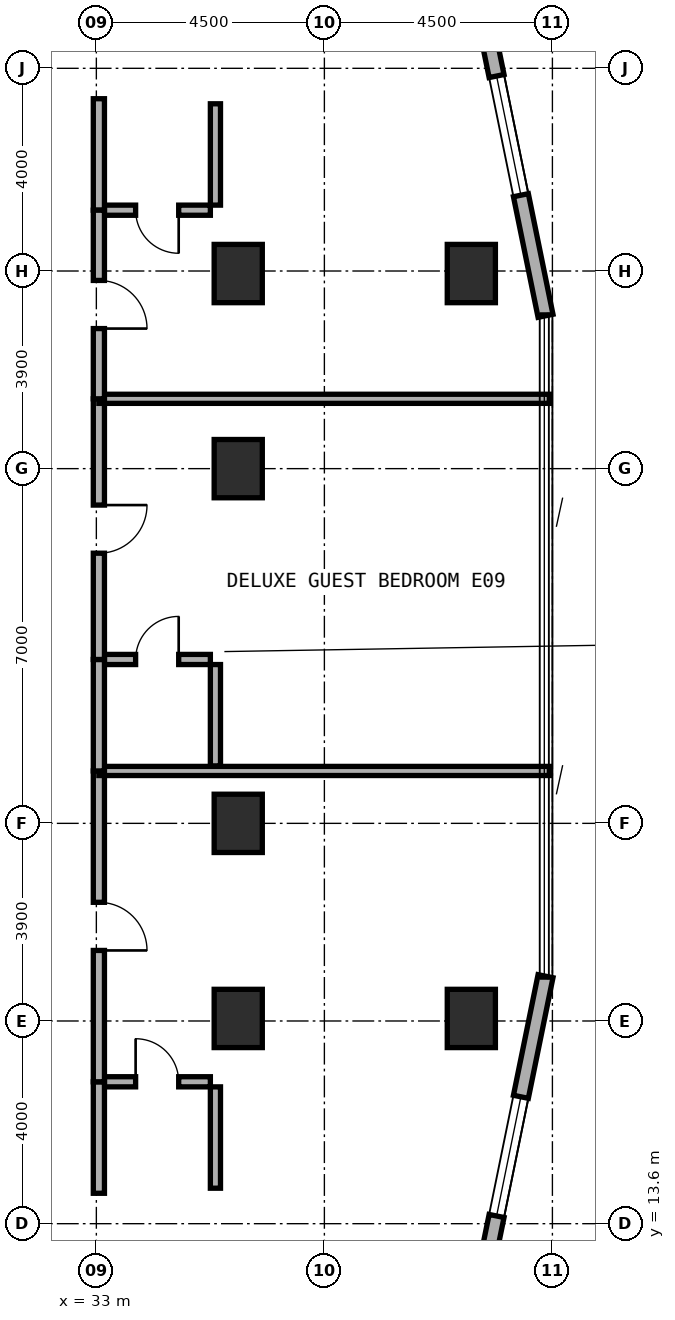
"""IFC4 building model, lengths in metres.
Left out: names, types, materials, properties, quantities, classifications, styles, units other than length and angle.
Written with IfcOpenShell. Run it as: python <this file> out.ifc"""

import sys

from ifc_helpers import new_model, si_unit, direction, frame, frame_2d, origin, origin_2d, place, context, subcontext, project, spatial, rectangle, extrude, element, fill, save


model = new_model("IFC4")
c1 = context("Model", 3, precision=1e-05, world=origin(), true_north=direction((0.0, 1.0)))
c2 = subcontext(c1, "Body", "Model", "MODEL_VIEW")
j1 = project(units=[si_unit("LENGTHUNIT", "METRE"), si_unit("PLANEANGLEUNIT", "RADIAN")], contexts=[c1])
p1 = place(None, origin())
s1 = spatial("IfcSite", under=j1, at=p1, CompositionType="ELEMENT")
p2 = place(p1, origin())
s2 = spatial("IfcBuilding", under=s1, at=p2, CompositionType="ELEMENT")
p3 = place(p2, frame((0.0, 0.0, 59.0)))
s3 = spatial("IfcBuildingStorey", under=s2, at=p3, CompositionType="ELEMENT", Elevation=59.0)
for number, where, z_axis, x_axis in (
    (1, (35.8, 21.5, 0.0), (0.0, 0.0, 1.0), (1.0, 0.0, 0.0)),
    (2, (35.8, 28.5, 0.0), (0.0, 0.0, 1.0), (1.0, 0.0, 0.0)),
    (3, (35.8, 17.65, 0.0), (0.0, 0.0, 1.0), (1.0, 0.0, 0.0)),
    (4, (35.8, 32.35, 0.0), (0.0, 0.0, 1.0), (1.0, 0.0, 0.0)),
    (5, (40.4, 17.65, 0.0), (0.0, 0.0, 1.0), (1.0, 0.0, 0.0)),
    (6, (40.4, 32.35, 0.0), (0.0, 0.0, 1.0), (1.0, 0.0, 0.0)),
):
    element("IfcColumn", number, at=place(p3, frame(where, z_axis=z_axis, x_axis=x_axis)), inside=s3, PredefinedType="COLUMN", context=c2, shape_type="SweptSolid", body=[
        extrude(rectangle(XDim=0.95, YDim=1.15, at=origin_2d()), origin(), (0.0, 0.0, 1.0), 3.5),
    ])
p4 = place(p3, frame((39.851, 8.622, 0.0), z_axis=(0.0, 0.0, 1.0), x_axis=(0.199990901713, 0.979797754249, 0.0)))
e7 = element("IfcWall", 7, at=p4, inside=s3, PredefinedType="STANDARD", context=c2, shape_type="SweptSolid", body=[
    extrude(rectangle(XDim=10.065, YDim=0.3, at=frame_2d((5.033, 0.0))), origin(), (0.0, 0.0, 1.0), 3.22),
])
p5 = place(p4, frame((0.378, 0.0, 0.85)))
e8 = element("IfcOpeningElement", 8, at=p5, cuts=e7, PredefinedType="OPENING", context=c2, shape_type="SweptSolid", body=[
    extrude(rectangle(XDim=1.8, YDim=1.5, at=frame_2d((0.9, 0.75))), frame((0.0, 0.16, 0.0), z_axis=(0.0, -1.0, 0.0), x_axis=(1.0, 0.0, 0.0)), (0.0, 0.0, 1.0), 0.32),
])
p6 = place(p4, frame((5.236, 0.0, 0.8)))
e9 = element("IfcOpeningElement", 9, at=p6, cuts=e7, PredefinedType="OPENING", context=c2, shape_type="SweptSolid", body=[
    extrude(rectangle(XDim=2.4, YDim=1.6, at=frame_2d((1.2, 0.8))), frame((0.0, 0.16, 0.0), z_axis=(0.0, -1.0, 0.0), x_axis=(1.0, 0.0, 0.0)), (0.0, 0.0, 1.0), 0.32),
])
p7 = place(p3, frame((41.864, 31.516, 0.0), z_axis=(0.0, 0.0, 1.0), x_axis=(-0.199990901713, 0.979797754249, 0.0)))
e10 = element("IfcWall", 10, at=p7, inside=s3, PredefinedType="STANDARD", context=c2, shape_type="SweptSolid", body=[
    extrude(rectangle(XDim=10.065, YDim=0.3, at=frame_2d((5.033, 0.0))), origin(), (0.0, 0.0, 1.0), 3.22),
])
p8 = place(p7, frame((2.429, 0.0, 0.8)))
e11 = element("IfcOpeningElement", 11, at=p8, cuts=e10, PredefinedType="OPENING", context=c2, shape_type="SweptSolid", body=[
    extrude(rectangle(XDim=2.4, YDim=1.6, at=frame_2d((1.2, 0.8))), frame((0.0, 0.16, 0.0), z_axis=(0.0, -1.0, 0.0), x_axis=(1.0, 0.0, 0.0)), (0.0, 0.0, 1.0), 0.32),
])
p9 = place(p7, frame((7.887, 0.0, 0.85)))
e12 = element("IfcOpeningElement", 12, at=p9, cuts=e10, PredefinedType="OPENING", context=c2, shape_type="SweptSolid", body=[
    extrude(rectangle(XDim=1.8, YDim=1.5, at=frame_2d((0.9, 0.75))), frame((0.0, 0.16, 0.0), z_axis=(0.0, -1.0, 0.0), x_axis=(1.0, 0.0, 0.0)), (0.0, 0.0, 1.0), 0.32),
])
p10 = place(p3, frame((33.15, 16.4, 0.0), z_axis=(0.0, 0.0, 1.0), x_axis=(1.0, 0.0, 0.0)))
e13 = element("IfcWall", 13, at=p10, inside=s3, PredefinedType="PLUMBINGWALL", context=c2, shape_type="SweptSolid", body=[
    extrude(rectangle(XDim=2.1, YDim=0.2, at=frame_2d((1.05, 0.0))), origin(), (0.0, 0.0, 1.0), 3.22),
])
p11 = place(p10, frame((0.625, 0.0, 0.0)))
e14 = element("IfcOpeningElement", 14, at=p11, cuts=e13, PredefinedType="OPENING", context=c2, shape_type="SweptSolid", body=[
    extrude(rectangle(XDim=0.85, YDim=2.1, at=frame_2d((0.425, 1.05))), frame((0.0, 0.11, 0.0), z_axis=(0.0, -1.0, 0.0), x_axis=(1.0, 0.0, 0.0)), (0.0, 0.0, 1.0), 0.22),
])
p12 = place(p3, frame((35.35, 14.3, 0.0), z_axis=(0.0, 0.0, 1.0), x_axis=(0.0, 1.0, 0.0)))
e15 = element("IfcWall", 15, at=p12, inside=s3, PredefinedType="PLUMBINGWALL", context=c2, shape_type="SweptSolid", body=[
    extrude(rectangle(XDim=2.0, YDim=0.2, at=frame_2d((1.0, 0.0))), origin(), (0.0, 0.0, 1.0), 2.745),
])
p13 = place(p3, frame((33.05, 14.2, 0.0), z_axis=(0.0, 0.0, 1.0), x_axis=(0.0, 1.0, 0.0)))
e16 = element("IfcWall", 16, at=p13, inside=s3, PredefinedType="SOLIDWALL", context=c2, shape_type="SweptSolid", body=[
    extrude(rectangle(XDim=2.2, YDim=0.22, at=frame_2d((1.1, 0.0))), origin(), (0.0, 0.0, 1.0), 3.22),
])
p14 = place(p3, frame((33.05, 16.4, 0.0), z_axis=(0.0, 0.0, 1.0), x_axis=(0.0, 1.0, 0.0)))
e17 = element("IfcWall", 17, at=p14, inside=s3, PredefinedType="SOLIDWALL", context=c2, shape_type="SweptSolid", body=[
    extrude(rectangle(XDim=6.134, YDim=0.22, at=frame_2d((3.067, 0.0))), origin(), (0.0, 0.0, 1.0), 2.495),
])
p15 = place(p14, frame((2.592, 0.0, 0.0)))
e18 = element("IfcOpeningElement", 18, at=p15, cuts=e17, PredefinedType="OPENING", context=c2, shape_type="SweptSolid", body=[
    extrude(rectangle(XDim=0.95, YDim=2.1, at=frame_2d((0.475, 1.05))), frame((0.0, 0.12, 0.0), z_axis=(0.0, -1.0, 0.0), x_axis=(1.0, 0.0, 0.0)), (0.0, 0.0, 1.0), 0.24),
])
p16 = place(p3, frame((33.05, 22.534, 0.0), z_axis=(0.0, 0.0, 1.0), x_axis=(1.0, 0.0, 0.0)))
e19 = element("IfcWall", 19, at=p16, inside=s3, PredefinedType="SOLIDWALL", context=c2, shape_type="SweptSolid", body=[
    extrude(rectangle(XDim=8.89, YDim=0.18, at=frame_2d((4.445, 0.0))), origin(), (0.0, 0.0, 1.0), 2.745),
])
p17 = place(p3, frame((33.15, 24.734, 0.0), z_axis=(0.0, 0.0, 1.0), x_axis=(1.0, 0.0, 0.0)))
e20 = element("IfcWall", 20, at=p17, inside=s3, PredefinedType="PLUMBINGWALL", context=c2, shape_type="SweptSolid", body=[
    extrude(rectangle(XDim=2.1, YDim=0.2, at=frame_2d((1.05, 0.0))), origin(), (0.0, 0.0, 1.0), 3.22),
])
p18 = place(p17, frame((0.625, 0.0, 0.0)))
e21 = element("IfcOpeningElement", 21, at=p18, cuts=e20, PredefinedType="OPENING", context=c2, shape_type="SweptSolid", body=[
    extrude(rectangle(XDim=0.85, YDim=2.1, at=frame_2d((0.425, 1.05))), frame((0.0, 0.11, 0.0), z_axis=(0.0, -1.0, 0.0), x_axis=(1.0, 0.0, 0.0)), (0.0, 0.0, 1.0), 0.22),
])
p19 = place(p3, frame((35.35, 22.634, 0.0), z_axis=(0.0, 0.0, 1.0), x_axis=(0.0, 1.0, 0.0)))
e22 = element("IfcWall", 22, at=p19, inside=s3, PredefinedType="PLUMBINGWALL", context=c2, shape_type="SweptSolid", body=[
    extrude(rectangle(XDim=2.0, YDim=0.2, at=frame_2d((1.0, 0.0))), origin(), (0.0, 0.0, 1.0), 3.22),
])
p20 = place(p3, frame((33.05, 22.534, 0.0), z_axis=(0.0, 0.0, 1.0), x_axis=(0.0, 1.0, 0.0)))
e23 = element("IfcWall", 23, at=p20, inside=s3, PredefinedType="SOLIDWALL", context=c2, shape_type="SweptSolid", body=[
    extrude(rectangle(XDim=2.2, YDim=0.22, at=frame_2d((1.1, 0.0))), origin(), (0.0, 0.0, 1.0), 3.22),
])
p21 = place(p3, frame((33.05, 24.734, 0.0), z_axis=(0.0, 0.0, 1.0), x_axis=(0.0, 1.0, 0.0)))
e24 = element("IfcWall", 24, at=p21, inside=s3, PredefinedType="SOLIDWALL", context=c2, shape_type="SweptSolid", body=[
    extrude(rectangle(XDim=5.144, YDim=0.22, at=frame_2d((2.572, 0.0))), origin(), (0.0, 0.0, 1.0), 2.495),
])
p22 = place(p21, frame((2.097, 0.0, 0.0)))
e25 = element("IfcOpeningElement", 25, at=p22, cuts=e24, PredefinedType="OPENING", context=c2, shape_type="SweptSolid", body=[
    extrude(rectangle(XDim=0.95, YDim=2.1, at=frame_2d((0.475, 1.05))), frame((0.0, 0.12, 0.0), z_axis=(0.0, -1.0, 0.0), x_axis=(1.0, 0.0, 0.0)), (0.0, 0.0, 1.0), 0.24),
])
p23 = place(p3, frame((33.05, 29.878, 0.0), z_axis=(0.0, 0.0, 1.0), x_axis=(1.0, 0.0, 0.0)))
e26 = element("IfcWall", 26, at=p23, inside=s3, PredefinedType="SOLIDWALL", context=c2, shape_type="SweptSolid", body=[
    extrude(rectangle(XDim=8.89, YDim=0.18, at=frame_2d((4.445, 0.0))), origin(), (0.0, 0.0, 1.0), 2.745),
])
p24 = place(p3, frame((33.15, 33.6, 0.0), z_axis=(0.0, 0.0, 1.0), x_axis=(1.0, 0.0, 0.0)))
e27 = element("IfcWall", 27, at=p24, inside=s3, PredefinedType="PLUMBINGWALL", context=c2, shape_type="SweptSolid", body=[
    extrude(rectangle(XDim=2.1, YDim=0.2, at=frame_2d((1.05, 0.0))), origin(), (0.0, 0.0, 1.0), 3.22),
])
p25 = place(p24, frame((0.625, 0.0, 0.0)))
e28 = element("IfcOpeningElement", 28, at=p25, cuts=e27, PredefinedType="OPENING", context=c2, shape_type="SweptSolid", body=[
    extrude(rectangle(XDim=0.85, YDim=2.1, at=frame_2d((0.425, 1.05))), frame((0.0, 0.11, 0.0), z_axis=(0.0, -1.0, 0.0), x_axis=(1.0, 0.0, 0.0)), (0.0, 0.0, 1.0), 0.22),
])
p26 = place(p3, frame((35.35, 33.7, 0.0), z_axis=(0.0, 0.0, 1.0), x_axis=(0.0, 1.0, 0.0)))
e29 = element("IfcWall", 29, at=p26, inside=s3, PredefinedType="PLUMBINGWALL", context=c2, shape_type="SweptSolid", body=[
    extrude(rectangle(XDim=2.0, YDim=0.2, at=frame_2d((1.0, 0.0))), origin(), (0.0, 0.0, 1.0), 2.745),
])
p27 = place(p3, frame((33.05, 33.6, 0.0), z_axis=(0.0, 0.0, 1.0), x_axis=(0.0, 1.0, 0.0)))
e30 = element("IfcWall", 30, at=p27, inside=s3, PredefinedType="SOLIDWALL", context=c2, shape_type="SweptSolid", body=[
    extrude(rectangle(XDim=2.2, YDim=0.22, at=frame_2d((1.1, 0.0))), origin(), (0.0, 0.0, 1.0), 3.22),
])
p28 = place(p3, frame((33.05, 29.878, 0.0), z_axis=(0.0, 0.0, 1.0), x_axis=(0.0, 1.0, 0.0)))
e31 = element("IfcWall", 31, at=p28, inside=s3, PredefinedType="SOLIDWALL", context=c2, shape_type="SweptSolid", body=[
    extrude(rectangle(XDim=3.722, YDim=0.22, at=frame_2d((1.861, 0.0))), origin(), (0.0, 0.0, 1.0), 2.495),
])
p29 = place(p28, frame((1.386, 0.0, 0.0)))
e32 = element("IfcOpeningElement", 32, at=p29, cuts=e31, PredefinedType="OPENING", context=c2, shape_type="SweptSolid", body=[
    extrude(rectangle(XDim=0.95, YDim=2.1, at=frame_2d((0.475, 1.05))), frame((0.0, 0.12, 0.0), z_axis=(0.0, -1.0, 0.0), x_axis=(1.0, 0.0, 0.0)), (0.0, 0.0, 1.0), 0.24),
])
p30 = place(p6, origin())
e33 = element("IfcWindow", 33, at=p30, inside=s3, PartitioningType="SINGLE_PANEL", PredefinedType="WINDOW", context=c2, shape_type="SweptSolid", body=[
    extrude(rectangle(XDim=2.4, YDim=1.6, at=frame_2d((1.2, 0.8))), frame((0.0, 0.03, 0.0), z_axis=(0.0, -1.0, 0.0), x_axis=(1.0, 0.0, 0.0)), (0.0, 0.0, 1.0), 0.06),
])
fill(e9, e33)
p31 = place(p8, origin())
e34 = element("IfcWindow", 34, at=p31, inside=s3, PartitioningType="SINGLE_PANEL", PredefinedType="WINDOW", context=c2, shape_type="SweptSolid", body=[
    extrude(rectangle(XDim=2.4, YDim=1.6, at=frame_2d((1.2, 0.8))), frame((0.0, 0.03, 0.0), z_axis=(0.0, -1.0, 0.0), x_axis=(1.0, 0.0, 0.0)), (0.0, 0.0, 1.0), 0.06),
])
fill(e11, e34)
p32 = place(p11, origin())
e35 = element("IfcDoor", 35, at=p32, inside=s3, OperationType="SINGLE_SWING_LEFT", PredefinedType="DOOR", context=c2, shape_type="SweptSolid", body=[
    extrude(rectangle(XDim=0.85, YDim=2.1, at=frame_2d((0.425, 1.05))), frame((0.0, 0.025, 0.0), z_axis=(0.0, -1.0, 0.0), x_axis=(1.0, 0.0, 0.0)), (0.0, 0.0, 1.0), 0.05),
])
fill(e14, e35)
p33 = place(p15, frame((0.95, 0.0, 0.0), z_axis=(0.0, 0.0, 1.0), x_axis=(-1.0, 0.0, 0.0)))
e36 = element("IfcDoor", 36, at=p33, inside=s3, OperationType="SINGLE_SWING_RIGHT", PredefinedType="DOOR", context=c2, shape_type="SweptSolid", body=[
    extrude(rectangle(XDim=0.95, YDim=2.1, at=frame_2d((0.475, 1.05))), frame((0.0, 0.025, 0.0), z_axis=(0.0, -1.0, 0.0), x_axis=(1.0, 0.0, 0.0)), (0.0, 0.0, 1.0), 0.05),
])
fill(e18, e36)
p34 = place(p18, origin())
e37 = element("IfcDoor", 37, at=p34, inside=s3, OperationType="SINGLE_SWING_RIGHT", PredefinedType="DOOR", context=c2, shape_type="SweptSolid", body=[
    extrude(rectangle(XDim=0.85, YDim=2.1, at=frame_2d((0.425, 1.05))), frame((0.0, 0.025, 0.0), z_axis=(0.0, -1.0, 0.0), x_axis=(1.0, 0.0, 0.0)), (0.0, 0.0, 1.0), 0.05),
])
fill(e21, e37)
p35 = place(p22, frame((0.95, 0.0, 0.0), z_axis=(0.0, 0.0, 1.0), x_axis=(-1.0, 0.0, 0.0)))
e38 = element("IfcDoor", 38, at=p35, inside=s3, OperationType="SINGLE_SWING_LEFT", PredefinedType="DOOR", context=c2, shape_type="SweptSolid", body=[
    extrude(rectangle(XDim=0.95, YDim=2.1, at=frame_2d((0.475, 1.05))), frame((0.0, 0.025, 0.0), z_axis=(0.0, -1.0, 0.0), x_axis=(1.0, 0.0, 0.0)), (0.0, 0.0, 1.0), 0.05),
])
fill(e25, e38)
p36 = place(p25, frame((0.85, 0.0, 0.0), z_axis=(0.0, 0.0, 1.0), x_axis=(-1.0, 0.0, 0.0)))
e39 = element("IfcDoor", 39, at=p36, inside=s3, OperationType="SINGLE_SWING_LEFT", PredefinedType="DOOR", context=c2, shape_type="SweptSolid", body=[
    extrude(rectangle(XDim=0.85, YDim=2.1, at=frame_2d((0.425, 1.05))), frame((0.0, 0.025, 0.0), z_axis=(0.0, -1.0, 0.0), x_axis=(1.0, 0.0, 0.0)), (0.0, 0.0, 1.0), 0.05),
])
fill(e28, e39)
p37 = place(p29, frame((0.95, 0.0, 0.0), z_axis=(0.0, 0.0, 1.0), x_axis=(-1.0, 0.0, 0.0)))
e40 = element("IfcDoor", 40, at=p37, inside=s3, OperationType="SINGLE_SWING_RIGHT", PredefinedType="DOOR", context=c2, shape_type="SweptSolid", body=[
    extrude(rectangle(XDim=0.95, YDim=2.1, at=frame_2d((0.475, 1.05))), frame((0.0, 0.025, 0.0), z_axis=(0.0, -1.0, 0.0), x_axis=(1.0, 0.0, 0.0)), (0.0, 0.0, 1.0), 0.05),
])
fill(e32, e40)
save(model, sys.argv[1])
